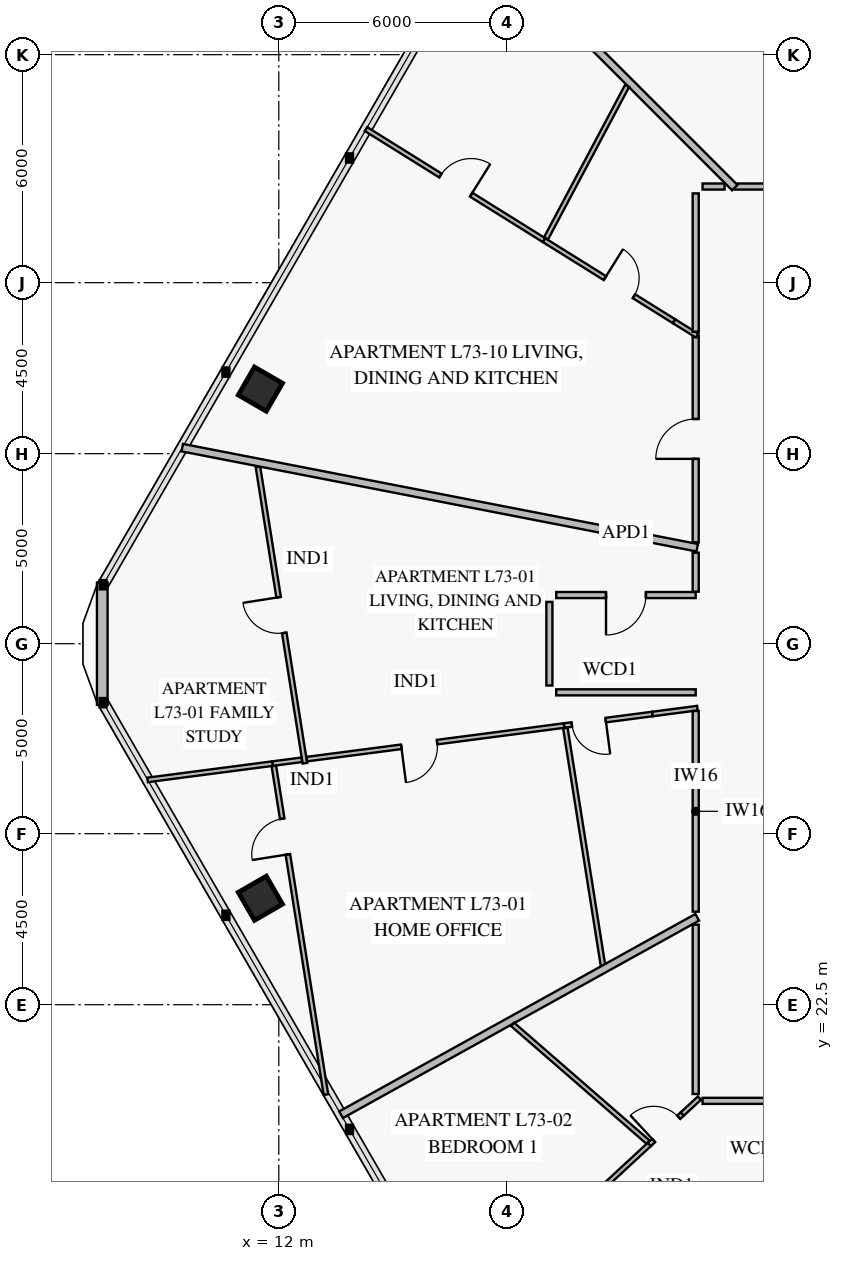
"""IFC4 building model, lengths in metres.
Left out: names, types, materials, properties, quantities, classifications, styles, units other than length and angle.
Written with IfcOpenShell. Run it as: python <this file> out.ifc"""

import sys

from ifc_helpers import new_model, si_unit, direction, frame, frame_2d, origin, origin_2d, place, context, subcontext, project, spatial, rectangle, extrude, element, fill, save


model = new_model("IFC4")
c1 = context("Model", 3, precision=1e-05, world=origin(), true_north=direction((0.0, 1.0)))
c2 = subcontext(c1, "Body", "Model", "MODEL_VIEW")
j1 = project(units=[si_unit("LENGTHUNIT", "METRE"), si_unit("PLANEANGLEUNIT", "RADIAN")], contexts=[c1])
p1 = place(None, origin())
s1 = spatial("IfcSite", under=j1, at=p1, CompositionType="ELEMENT")
p2 = place(p1, origin())
s2 = spatial("IfcBuilding", under=s1, at=p2, CompositionType="ELEMENT")
p3 = place(p2, frame((0.0, 0.0, 288.2)))
s3 = spatial("IfcBuildingStorey", under=s2, at=p3, CompositionType="ELEMENT", Elevation=288.2)
for number, where, z_axis, x_axis in (
    (1, (11.515, 38.699, 0.0), (0.0, 0.0, 1.0), (-0.5, -0.866, 0.0)),
    (2, (11.515, 25.301, 0.0), (0.0, 0.0, 1.0), (0.5, -0.866, 0.0)),
):
    element("IfcColumn", number, at=place(p3, frame(where, z_axis=z_axis, x_axis=x_axis)), inside=s3, PredefinedType="COLUMN", context=c2, shape_type="SweptSolid", body=[
        extrude(rectangle(XDim=0.85, YDim=0.85, at=origin_2d()), origin(), (0.0, 0.0, 1.0), 3.55),
    ])
p4 = place(p3, frame((7.355, 30.393, 0.0), z_axis=(0.0, 0.0, 1.0), x_axis=(0.0, 1.0, 0.0)))
e3 = element("IfcWall", 3, at=p4, inside=s3, PredefinedType="SOLIDWALL", context=c2, shape_type="SweptSolid", body=[
    extrude(rectangle(XDim=3.215, YDim=0.28, at=frame_2d((1.607, 0.0))), origin(), (0.0, 0.0, 1.0), 3.55),
])
p5 = place(p3, frame((11.452, 36.651, 0.0), z_axis=(0.0, 0.0, 1.0), x_axis=(0.156434250771, -0.987688374532, 0.0)))
e4 = element("IfcWall", 4, at=p5, inside=s3, PredefinedType="PARTITIONING", context=c2, shape_type="SweptSolid", body=[
    extrude(rectangle(XDim=7.894, YDim=0.12, at=frame_2d((3.947, 0.0))), origin(), (0.0, 0.0, 1.0), 2.93),
])
p6 = place(p5, frame((3.472, 0.0, 0.0)))
e5 = element("IfcOpeningElement", 5, at=p6, cuts=e4, PredefinedType="OPENING", context=c2, shape_type="SweptSolid", body=[
    extrude(rectangle(XDim=0.95, YDim=2.1, at=frame_2d((0.475, 1.05))), frame((0.0, 0.072, 0.0), z_axis=(0.0, -1.0, 0.0), x_axis=(1.0, 0.0, 0.0)), (0.0, 0.0, 1.0), 0.144),
])
p7 = place(p3, frame((21.833, 30.15, 0.0), z_axis=(0.0, 0.0, 1.0), x_axis=(-0.991584748444, -0.129459208454, 0.0)))
e6 = element("IfcWall", 6, at=p7, inside=s3, PredefinedType="PARTITIONING", context=c2, shape_type="SweptSolid", body=[
    extrude(rectangle(XDim=2.348, YDim=0.12, at=frame_2d((1.174, 0.0))), origin(), (0.0, 0.0, 1.0), 3.55),
])
p8 = place(p7, frame((1.24, 0.0, 0.0)))
e7 = element("IfcOpeningElement", 7, at=p8, cuts=e6, PredefinedType="OPENING", context=c2, shape_type="SweptSolid", body=[
    extrude(rectangle(XDim=0.9, YDim=2.1, at=frame_2d((0.45, 1.05))), frame((0.0, 0.072, 0.0), z_axis=(0.0, -1.0, 0.0), x_axis=(1.0, 0.0, 0.0)), (0.0, 0.0, 1.0), 0.144),
])
p9 = place(p3, frame((19.505, 29.846, 0.0), z_axis=(0.0, 0.0, 1.0), x_axis=(-0.99158264657, -0.129475306608, 0.0)))
e8 = element("IfcWall", 8, at=p9, inside=s3, PredefinedType="PARTITIONING", context=c2, shape_type="SweptSolid", body=[
    extrude(rectangle(XDim=6.824, YDim=0.12, at=frame_2d((3.412, 0.0))), origin(), (0.0, 0.0, 1.0), 3.55),
])
p10 = place(p9, frame((3.368, 0.0, 0.0)))
e9 = element("IfcOpeningElement", 9, at=p10, cuts=e8, PredefinedType="OPENING", context=c2, shape_type="SweptSolid", body=[
    extrude(rectangle(XDim=0.95, YDim=2.1, at=frame_2d((0.475, 1.05))), frame((0.0, 0.072, 0.0), z_axis=(0.0, -1.0, 0.0), x_axis=(1.0, 0.0, 0.0)), (0.0, 0.0, 1.0), 0.144),
])
p11 = place(p3, frame((12.604, 28.945, 0.0), z_axis=(0.0, 0.0, 1.0), x_axis=(-0.99158987253, -0.129419954782, 0.0)))
e10 = element("IfcWall", 10, at=p11, inside=s3, PredefinedType="PARTITIONING", context=c2, shape_type="SweptSolid", body=[
    extrude(rectangle(XDim=0.775, YDim=0.12, at=frame_2d((0.388, 0.0))), origin(), (0.0, 0.0, 1.0), 3.55),
])
p12 = place(p3, frame((11.87, 28.781, 0.0), z_axis=(0.0, 0.0, 1.0), x_axis=(0.156433742153, -0.987688455089, 0.0)))
e11 = element("IfcWall", 11, at=p12, inside=s3, PredefinedType="PARTITIONING", context=c2, shape_type="SweptSolid", body=[
    extrude(rectangle(XDim=8.754, YDim=0.12, at=frame_2d((4.377, 0.0))), origin(), (0.0, 0.0, 1.0), 2.93),
])
p13 = place(p12, frame((1.404, 0.0, 0.0)))
e12 = element("IfcOpeningElement", 12, at=p13, cuts=e11, PredefinedType="OPENING", context=c2, shape_type="SweptSolid", body=[
    extrude(rectangle(XDim=0.95, YDim=2.1, at=frame_2d((0.475, 1.05))), frame((0.0, 0.072, 0.0), z_axis=(0.0, -1.0, 0.0), x_axis=(1.0, 0.0, 0.0)), (0.0, 0.0, 1.0), 0.144),
])
p14 = place(p3, frame((22.97, 33.28, 0.0), z_axis=(0.0, 0.0, 1.0), x_axis=(-1.0, 0.0, 0.0)))
e13 = element("IfcWall", 13, at=p14, inside=s3, PredefinedType="PARTITIONING", context=c2, shape_type="SweptSolid", body=[
    extrude(rectangle(XDim=3.67, YDim=0.16, at=frame_2d((1.835, 0.0))), origin(), (0.0, 0.0, 1.0), 3.55),
])
p15 = place(p14, frame((1.31, 0.0, 0.0)))
e14 = element("IfcOpeningElement", 14, at=p15, cuts=e13, PredefinedType="OPENING", context=c2, shape_type="SweptSolid", body=[
    extrude(rectangle(XDim=1.05, YDim=2.15, at=frame_2d((0.525, 1.075))), frame((0.0, 0.092, 0.0), z_axis=(0.0, -1.0, 0.0), x_axis=(1.0, 0.0, 0.0)), (0.0, 0.0, 1.0), 0.184),
])
p16 = place(p3, frame((22.616, 19.624, 0.0), z_axis=(0.0, 0.0, 1.0), x_axis=(-0.734367339526, -0.678752245401, 0.0)))
e15 = element("IfcWall", 15, at=p16, inside=s3, PredefinedType="PARTITIONING", context=c2, shape_type="SweptSolid", body=[
    extrude(rectangle(XDim=1.181, YDim=0.12, at=frame_2d((0.59, 0.0))), origin(), (0.0, 0.0, 1.0), 3.55),
])
p17 = place(p16, frame((0.126, 0.0, 0.0)))
e16 = element("IfcOpeningElement", 16, at=p17, cuts=e15, PredefinedType="OPENING", context=c2, shape_type="SweptSolid", body=[
    extrude(rectangle(XDim=0.9, YDim=2.1, at=frame_2d((0.45, 1.05))), frame((0.0, 0.072, 0.0), z_axis=(0.0, -1.0, 0.0), x_axis=(1.0, 0.0, 0.0)), (0.0, 0.0, 1.0), 0.144),
])
p18 = place(p3, frame((21.749, 18.822, 0.0), z_axis=(0.0, 0.0, 1.0), x_axis=(-0.734170781852, -0.678964846715, 0.0)))
e17 = element("IfcWall", 17, at=p18, inside=s3, PredefinedType="PARTITIONING", context=c2, shape_type="SweptSolid", body=[
    extrude(rectangle(XDim=1.791, YDim=0.12, at=frame_2d((0.896, 0.0))), origin(), (0.0, 0.0, 1.0), 3.15),
])
p19 = place(p3, frame((23.15, 19.97, 0.0), z_axis=(0.0, 0.0, 1.0), x_axis=(1.0, 0.0, 0.0)))
e18 = element("IfcWall", 18, at=p19, inside=s3, PredefinedType="PARTITIONING", context=c2, shape_type="SweptSolid", body=[
    extrude(rectangle(XDim=8.09, YDim=0.16, at=frame_2d((4.045, 0.0))), origin(), (0.0, 0.0, 1.0), 2.95),
])
p20 = place(p19, frame((3.52, 0.0, 0.0)))
e19 = element("IfcOpeningElement", 19, at=p20, cuts=e18, PredefinedType="OPENING", context=c2, shape_type="SweptSolid", body=[
    extrude(rectangle(XDim=1.05, YDim=2.15, at=frame_2d((0.525, 1.075))), frame((0.0, 0.092, 0.0), z_axis=(0.0, -1.0, 0.0), x_axis=(1.0, 0.0, 0.0)), (0.0, 0.0, 1.0), 0.184),
])
p21 = place(p3, frame((33.641, 44.03, 0.0), z_axis=(0.0, 0.0, 1.0), x_axis=(-1.0, 0.0, 0.0)))
e20 = element("IfcWall", 20, at=p21, inside=s3, PredefinedType="PARTITIONING", context=c2, shape_type="SweptSolid", body=[
    extrude(rectangle(XDim=9.643, YDim=0.16, at=frame_2d((4.821, 0.0))), origin(), (0.0, 0.0, 1.0), 2.95),
])
p22 = place(p21, frame((4.246, 0.0, 0.0)))
e21 = element("IfcOpeningElement", 21, at=p22, cuts=e20, PredefinedType="OPENING", context=c2, shape_type="SweptSolid", body=[
    extrude(rectangle(XDim=1.15, YDim=2.2, at=frame_2d((0.575, 1.1))), frame((0.0, 0.092, 0.0), z_axis=(0.0, -1.0, 0.0), x_axis=(1.0, 0.0, 0.0)), (0.0, 0.0, 1.0), 0.184),
])
p23 = place(p3, frame((22.4, 40.485, 0.0), z_axis=(0.0, 0.0, 1.0), x_axis=(-0.848426577967, 0.529313084856, 0.0)))
e22 = element("IfcWall", 22, at=p23, inside=s3, PredefinedType="PARTITIONING", context=c2, shape_type="SweptSolid", body=[
    extrude(rectangle(XDim=4.033, YDim=0.12, at=frame_2d((2.016, 0.0))), origin(), (0.0, 0.0, 1.0), 3.15),
])
p24 = place(p23, frame((1.244, 0.0, 0.0)))
e23 = element("IfcOpeningElement", 23, at=p24, cuts=e22, PredefinedType="OPENING", context=c2, shape_type="SweptSolid", body=[
    extrude(rectangle(XDim=0.9, YDim=2.1, at=frame_2d((0.45, 1.05))), frame((0.0, 0.072, 0.0), z_axis=(0.0, -1.0, 0.0), x_axis=(1.0, 0.0, 0.0)), (0.0, 0.0, 1.0), 0.144),
])
p25 = place(p3, frame((18.979, 42.62, 0.0), z_axis=(0.0, 0.0, 1.0), x_axis=(-0.848420368306, 0.529323038081, 0.0)))
e24 = element("IfcWall", 24, at=p25, inside=s3, PredefinedType="PARTITIONING", context=c2, shape_type="SweptSolid", body=[
    extrude(rectangle(XDim=5.521, YDim=0.12, at=frame_2d((2.76, 0.0))), origin(), (0.0, 0.0, 1.0), 2.93),
])
p26 = place(p25, frame((2.26, 0.0, 0.0)))
e25 = element("IfcOpeningElement", 25, at=p26, cuts=e24, PredefinedType="OPENING", context=c2, shape_type="SweptSolid", body=[
    extrude(rectangle(XDim=0.95, YDim=2.1, at=frame_2d((0.475, 1.05))), frame((0.0, 0.072, 0.0), z_axis=(0.0, -1.0, 0.0), x_axis=(1.0, 0.0, 0.0)), (0.0, 0.0, 1.0), 0.144),
])
p27 = place(p3, frame((22.97, 40.106, 0.0), z_axis=(0.0, 0.0, 1.0), x_axis=(0.0, -1.0, 0.0)))
e26 = element("IfcWall", 26, at=p27, inside=s3, PredefinedType="PARTITIONING", context=c2, shape_type="SweptSolid", body=[
    extrude(rectangle(XDim=5.434, YDim=0.16, at=frame_2d((2.717, 0.0))), origin(), (0.0, 0.0, 1.0), 2.95),
])
p28 = place(p27, frame((2.192, 0.0, 0.0)))
e27 = element("IfcOpeningElement", 27, at=p28, cuts=e26, PredefinedType="OPENING", context=c2, shape_type="SweptSolid", body=[
    extrude(rectangle(XDim=1.05, YDim=2.15, at=frame_2d((0.525, 1.075))), frame((0.0, 0.092, 0.0), z_axis=(0.0, -1.0, 0.0), x_axis=(1.0, 0.0, 0.0)), (0.0, 0.0, 1.0), 0.184),
])
p29 = place(p3, frame((23.01, 34.525, 0.0), z_axis=(0.0, 0.0, 1.0), x_axis=(-0.981627538439, 0.190807169093, 0.0)))
e28 = element("IfcWall", 28, at=p29, inside=s3, PredefinedType="PARTITIONING", context=c2, shape_type="SweptSolid", body=[
    extrude(rectangle(XDim=13.803, YDim=0.2, at=frame_2d((6.902, 0.0))), origin(), (0.0, 0.0, 1.0), 2.93),
])
p30 = place(p3, frame((23.015, 30.304, 0.0), z_axis=(0.0, 0.0, 1.0), x_axis=(-0.991582122711, -0.129479318503, 0.0)))
e29 = element("IfcWall", 29, at=p30, inside=s3, PredefinedType="PARTITIONING", context=c2, shape_type="SweptSolid", body=[
    extrude(rectangle(XDim=1.192, YDim=0.12, at=frame_2d((0.596, 0.0))), origin(), (0.0, 0.0, 1.0), 3.55),
])
p31 = place(p3, frame((11.835, 28.844, 0.0), z_axis=(0.0, 0.0, 1.0), x_axis=(-0.991583154188, -0.129471418974, 0.0)))
e30 = element("IfcWall", 30, at=p31, inside=s3, PredefinedType="PARTITIONING", context=c2, shape_type="SweptSolid", body=[
    extrude(rectangle(XDim=3.315, YDim=0.12, at=frame_2d((1.657, 0.0))), origin(), (0.0, 0.0, 1.0), 2.93),
])
p32 = place(p3, frame((19.541, 29.782, 0.0), z_axis=(0.0, 0.0, 1.0), x_axis=(0.156450653455, -0.987685776466, 0.0)))
e31 = element("IfcWall", 31, at=p32, inside=s3, PredefinedType="PARTITIONING", context=c2, shape_type="SweptSolid", body=[
    extrude(rectangle(XDim=6.37, YDim=0.12, at=frame_2d((3.185, 0.0))), origin(), (0.0, 0.0, 1.0), 2.95),
])
p33 = place(p3, frame((23.01, 24.8, 0.0), z_axis=(0.0, 0.0, 1.0), x_axis=(-0.874612572959, -0.484822490426, 0.0)))
e32 = element("IfcWall", 32, at=p33, inside=s3, PredefinedType="PARTITIONING", context=c2, shape_type="SweptSolid", body=[
    extrude(rectangle(XDim=10.715, YDim=0.2, at=frame_2d((5.358, 0.0))), origin(), (0.0, 0.0, 1.0), 2.93),
])
p34 = place(p3, frame((23.069, 20.042, 0.0), z_axis=(0.0, 0.0, 1.0), x_axis=(-0.73410437669, -0.67903664417, 0.0)))
e33 = element("IfcWall", 33, at=p34, inside=s3, PredefinedType="PARTITIONING", context=c2, shape_type="SweptSolid", body=[
    extrude(rectangle(XDim=0.616, YDim=0.12, at=frame_2d((0.308, 0.0))), origin(), (0.0, 0.0, 1.0), 3.55),
])
p35 = place(p3, frame((18.151, 21.983, 0.0), z_axis=(0.0, 0.0, 1.0), x_axis=(0.754743487658, -0.656020020912, 0.0)))
e34 = element("IfcWall", 34, at=p35, inside=s3, PredefinedType="PARTITIONING", context=c2, shape_type="SweptSolid", body=[
    extrude(rectangle(XDim=4.723, YDim=0.12, at=frame_2d((2.362, 0.0))), origin(), (0.0, 0.0, 1.0), 3.15),
])
p36 = place(p3, frame((23.998, 44.002, 0.0), z_axis=(0.0, 0.0, 1.0), x_axis=(-0.707106781187, 0.707106781187, 0.0)))
e35 = element("IfcWall", 35, at=p36, inside=s3, PredefinedType="PARTITIONING", context=c2, shape_type="SweptSolid", body=[
    extrude(rectangle(XDim=7.915, YDim=0.2, at=frame_2d((3.958, 0.0))), origin(), (0.0, 0.0, 1.0), 2.95),
])
p37 = place(p3, frame((23.008, 40.106, 0.0), z_axis=(0.0, 0.0, 1.0), x_axis=(-0.848342652785, 0.529447583304, 0.0)))
e36 = element("IfcWall", 36, at=p37, inside=s3, PredefinedType="PARTITIONING", context=c2, shape_type="SweptSolid", body=[
    extrude(rectangle(XDim=0.717, YDim=0.12, at=frame_2d((0.358, 0.0))), origin(), (0.0, 0.0, 1.0), 3.55),
])
p38 = place(p3, frame((21.166, 46.681, 0.0), z_axis=(0.0, 0.0, 1.0), x_axis=(-0.469475824994, -0.88294532659, 0.0)))
e37 = element("IfcWall", 37, at=p38, inside=s3, PredefinedType="PARTITIONING", context=c2, shape_type="SweptSolid", body=[
    extrude(rectangle(XDim=4.547, YDim=0.12, at=frame_2d((2.273, 0.0))), origin(), (0.0, 0.0, 1.0), 2.95),
])
p39 = place(p3, frame((19.3, 30.72, 0.0), z_axis=(0.0, 0.0, 1.0), x_axis=(1.0, 0.0, 0.0)))
e38 = element("IfcWall", 38, at=p39, inside=s3, PredefinedType="PARTITIONING", context=c2, shape_type="SweptSolid", body=[
    extrude(rectangle(XDim=3.67, YDim=0.16, at=frame_2d((1.835, 0.0))), origin(), (0.0, 0.0, 1.0), 3.55),
])
p40 = place(p3, frame((19.12, 33.1, 0.0), z_axis=(0.0, 0.0, 1.0), x_axis=(0.0, -1.0, 0.0)))
e39 = element("IfcWall", 39, at=p40, inside=s3, PredefinedType="PARTITIONING", context=c2, shape_type="SweptSolid", body=[
    extrude(rectangle(XDim=2.2, YDim=0.16, at=frame_2d((1.1, 0.0))), origin(), (0.0, 0.0, 1.0), 3.55),
])
p41 = place(p3, frame((22.97, 34.395, 0.0), z_axis=(0.0, 0.0, 1.0), x_axis=(0.0, -1.0, 0.0)))
e40 = element("IfcWall", 40, at=p41, inside=s3, PredefinedType="PARTITIONING", context=c2, shape_type="SweptSolid", body=[
    extrude(rectangle(XDim=1.027, YDim=0.16, at=frame_2d((0.513, 0.0))), origin(), (0.0, 0.0, 1.0), 3.55),
])
p42 = place(p3, frame((22.97, 30.23, 0.0), z_axis=(0.0, 0.0, 1.0), x_axis=(0.0, -1.0, 0.0)))
e41 = element("IfcWall", 41, at=p42, inside=s3, PredefinedType="PARTITIONING", context=c2, shape_type="SweptSolid", body=[
    extrude(rectangle(XDim=5.282, YDim=0.16, at=frame_2d((2.641, 0.0))), origin(), (0.0, 0.0, 1.0), 2.95),
])
p43 = place(p3, frame((22.97, 24.605, 0.0), z_axis=(0.0, 0.0, 1.0), x_axis=(0.0, -1.0, 0.0)))
e42 = element("IfcWall", 42, at=p43, inside=s3, PredefinedType="PARTITIONING", context=c2, shape_type="SweptSolid", body=[
    extrude(rectangle(XDim=4.455, YDim=0.16, at=frame_2d((2.228, 0.0))), origin(), (0.0, 0.0, 1.0), 3.55),
])
p44 = place(p3, frame((22.97, 43.85, 0.0), z_axis=(0.0, 0.0, 1.0), x_axis=(0.0, -1.0, 0.0)))
e43 = element("IfcWall", 43, at=p44, inside=s3, PredefinedType="PARTITIONING", context=c2, shape_type="SweptSolid", body=[
    extrude(rectangle(XDim=3.641, YDim=0.16, at=frame_2d((1.82, 0.0))), origin(), (0.0, 0.0, 1.0), 3.55),
])
p45 = place(p3, frame((23.729, 44.03, 0.0), z_axis=(0.0, 0.0, 1.0), x_axis=(-1.0, 0.0, 0.0)))
e44 = element("IfcWall", 44, at=p45, inside=s3, PredefinedType="PARTITIONING", context=c2, shape_type="SweptSolid", body=[
    extrude(rectangle(XDim=0.58, YDim=0.16, at=frame_2d((0.29, 0.0))), origin(), (0.0, 0.0, 1.0), 2.95),
])
p46 = place(p6, frame((0.95, 0.0, 0.0), z_axis=(0.0, 0.0, 1.0), x_axis=(-1.0, 0.0, 0.0)))
e45 = element("IfcDoor", 45, at=p46, inside=s3, OperationType="SINGLE_SWING_RIGHT", PredefinedType="DOOR", context=c2, shape_type="SweptSolid", body=[
    extrude(rectangle(XDim=0.95, YDim=2.1, at=frame_2d((0.475, 1.05))), frame((0.0, 0.025, 0.0), z_axis=(0.0, -1.0, 0.0), x_axis=(1.0, 0.0, 0.0)), (0.0, 0.0, 1.0), 0.05),
])
fill(e5, e45)
p47 = place(p8, origin())
e46 = element("IfcDoor", 46, at=p47, inside=s3, OperationType="SINGLE_SWING_LEFT", PredefinedType="DOOR", context=c2, shape_type="SweptSolid", body=[
    extrude(rectangle(XDim=0.9, YDim=2.1, at=frame_2d((0.45, 1.05))), frame((0.0, 0.025, 0.0), z_axis=(0.0, -1.0, 0.0), x_axis=(1.0, 0.0, 0.0)), (0.0, 0.0, 1.0), 0.05),
])
fill(e7, e46)
p48 = place(p10, origin())
e47 = element("IfcDoor", 47, at=p48, inside=s3, OperationType="SINGLE_SWING_RIGHT", PredefinedType="DOOR", context=c2, shape_type="SweptSolid", body=[
    extrude(rectangle(XDim=0.95, YDim=2.1, at=frame_2d((0.475, 1.05))), frame((0.0, 0.025, 0.0), z_axis=(0.0, -1.0, 0.0), x_axis=(1.0, 0.0, 0.0)), (0.0, 0.0, 1.0), 0.05),
])
fill(e9, e47)
p49 = place(p13, frame((0.95, 0.0, 0.0), z_axis=(0.0, 0.0, 1.0), x_axis=(-1.0, 0.0, 0.0)))
e48 = element("IfcDoor", 48, at=p49, inside=s3, OperationType="SINGLE_SWING_LEFT", PredefinedType="DOOR", context=c2, shape_type="SweptSolid", body=[
    extrude(rectangle(XDim=0.95, YDim=2.1, at=frame_2d((0.475, 1.05))), frame((0.0, 0.025, 0.0), z_axis=(0.0, -1.0, 0.0), x_axis=(1.0, 0.0, 0.0)), (0.0, 0.0, 1.0), 0.05),
])
fill(e12, e48)
p50 = place(p15, origin())
e49 = element("IfcDoor", 49, at=p50, inside=s3, OperationType="SINGLE_SWING_RIGHT", PredefinedType="DOOR", context=c2, shape_type="SweptSolid", body=[
    extrude(rectangle(XDim=1.05, YDim=2.15, at=frame_2d((0.525, 1.075))), frame((0.0, 0.025, 0.0), z_axis=(0.0, -1.0, 0.0), x_axis=(1.0, 0.0, 0.0)), (0.0, 0.0, 1.0), 0.05),
])
fill(e14, e49)
p51 = place(p17, frame((0.9, 0.0, 0.0), z_axis=(0.0, 0.0, 1.0), x_axis=(-1.0, 0.0, 0.0)))
e50 = element("IfcDoor", 50, at=p51, inside=s3, OperationType="SINGLE_SWING_LEFT", PredefinedType="DOOR", context=c2, shape_type="SweptSolid", body=[
    extrude(rectangle(XDim=0.9, YDim=2.1, at=frame_2d((0.45, 1.05))), frame((0.0, 0.025, 0.0), z_axis=(0.0, -1.0, 0.0), x_axis=(1.0, 0.0, 0.0)), (0.0, 0.0, 1.0), 0.05),
])
fill(e16, e50)
p52 = place(p24, frame((0.9, 0.0, 0.0), z_axis=(0.0, 0.0, 1.0), x_axis=(-1.0, 0.0, 0.0)))
e51 = element("IfcDoor", 51, at=p52, inside=s3, OperationType="SINGLE_SWING_LEFT", PredefinedType="DOOR", context=c2, shape_type="SweptSolid", body=[
    extrude(rectangle(XDim=0.9, YDim=2.1, at=frame_2d((0.45, 1.05))), frame((0.0, 0.025, 0.0), z_axis=(0.0, -1.0, 0.0), x_axis=(1.0, 0.0, 0.0)), (0.0, 0.0, 1.0), 0.05),
])
fill(e23, e51)
p53 = place(p26, frame((0.95, 0.0, 0.0), z_axis=(0.0, 0.0, 1.0), x_axis=(-1.0, 0.0, 0.0)))
e52 = element("IfcDoor", 52, at=p53, inside=s3, OperationType="SINGLE_SWING_RIGHT", PredefinedType="DOOR", context=c2, shape_type="SweptSolid", body=[
    extrude(rectangle(XDim=0.95, YDim=2.1, at=frame_2d((0.475, 1.05))), frame((0.0, 0.025, 0.0), z_axis=(0.0, -1.0, 0.0), x_axis=(1.0, 0.0, 0.0)), (0.0, 0.0, 1.0), 0.05),
])
fill(e25, e52)
p54 = place(p28, frame((1.05, 0.0, 0.0), z_axis=(0.0, 0.0, 1.0), x_axis=(-1.0, 0.0, 0.0)))
e53 = element("IfcDoor", 53, at=p54, inside=s3, OperationType="SINGLE_SWING_LEFT", PredefinedType="DOOR", context=c2, shape_type="SweptSolid", body=[
    extrude(rectangle(XDim=1.05, YDim=2.15, at=frame_2d((0.525, 1.075))), frame((0.0, 0.025, 0.0), z_axis=(0.0, -1.0, 0.0), x_axis=(1.0, 0.0, 0.0)), (0.0, 0.0, 1.0), 0.05),
])
fill(e27, e53)
save(model, sys.argv[1])
